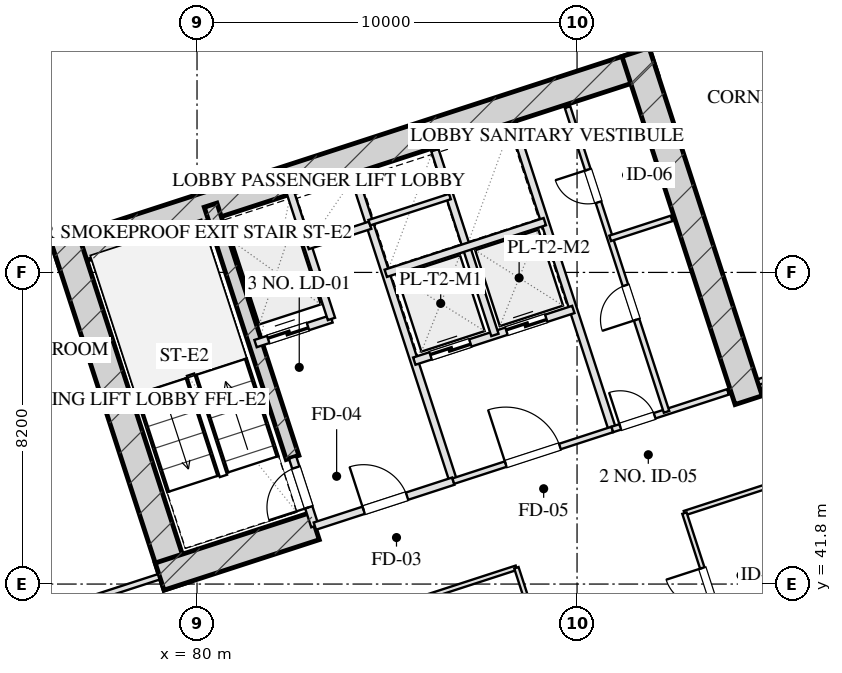
"""IFC4 building model, lengths in metres.
Left out: names, types, materials, properties, quantities, classifications, styles, units other than length and angle.
Written with IfcOpenShell. Run it as: python <this file> out.ifc"""

import sys

from ifc_helpers import new_model, si_unit, direction, frame, frame_2d, origin, place, context, subcontext, project, spatial, rectangle, extrude, element, fill, save


model = new_model("IFC4")
c1 = context("Model", 3, precision=1e-05, world=origin(), true_north=direction((0.0, 1.0)))
c2 = subcontext(c1, "Body", "Model", "MODEL_VIEW")
j1 = project(units=[si_unit("LENGTHUNIT", "METRE"), si_unit("PLANEANGLEUNIT", "RADIAN")], contexts=[c1])
p1 = place(None, origin())
s1 = spatial("IfcSite", under=j1, at=p1, CompositionType="ELEMENT")
p2 = place(p1, origin())
s2 = spatial("IfcBuilding", under=s1, at=p2, CompositionType="ELEMENT")
p3 = place(p2, frame((0.0, 0.0, 85.1)))
s3 = spatial("IfcBuildingStorey", under=s2, at=p3, CompositionType="ELEMENT", Elevation=85.1)
p4 = place(p3, frame((76.272, 50.443, 0.0), z_axis=(0.0, 0.0, 1.0), x_axis=(0.951056072937, 0.309018358888, 0.0)))
e1 = element("IfcWall", 1, at=p4, inside=s3, PredefinedType="SHEAR", context=c2, shape_type="SweptSolid", body=[
    extrude(rectangle(XDim=16.55, YDim=0.75, at=frame_2d((8.275, 0.0))), origin(), (0.0, 0.0, 1.0), 3.45),
])
for number, where, z_axis, x_axis in (
    (2, (79.489, 41.756, 0.0), (0.0, 0.0, 1.0), (-0.309, 0.951, 0.0)),
    (3, (94.515, 46.639, 0.0), (0.0, 0.0, 1.0), (-0.309, 0.951, 0.0)),
):
    element("IfcWall", number, at=place(p3, frame(where, z_axis=z_axis, x_axis=x_axis)), inside=s3, PredefinedType="SHEAR", context=c2, shape_type="SweptSolid", body=[
        extrude(rectangle(XDim=9.63, YDim=0.75, at=frame_2d((4.815, 0.0))), origin(), (0.0, 0.0, 1.0), 3.45),
    ])
p5 = place(p3, frame((82.514, 45.131, 0.0), z_axis=(0.0, 0.0, 1.0), x_axis=(-0.308988790936, 0.951065679686, 0.0)))
e4 = element("IfcWall", 4, at=p5, inside=s3, PredefinedType="SHEAR", context=c2, shape_type="SweptSolid", body=[
    extrude(rectangle(XDim=6.98, YDim=0.35, at=frame_2d((3.49, 0.0))), origin(), (0.0, 0.0, 1.0), 3.45),
])
p6 = place(p3, frame((79.016, 41.997, 0.0), z_axis=(0.0, 0.0, 1.0), x_axis=(0.95106038264, 0.309005094736, 0.0)))
e5 = element("IfcWall", 5, at=p6, inside=s3, PredefinedType="SHEAR", context=c2, shape_type="SweptSolid", body=[
    extrude(rectangle(XDim=4.295, YDim=0.75, at=frame_2d((2.147, 0.0))), origin(), (0.0, 0.0, 1.0), 3.45),
])
p7 = place(p3, frame((80.716, 6.59, 0.0), z_axis=(0.0, 0.0, 1.0), x_axis=(-0.309017542002, 0.95105633836, 0.0)))
e6 = element("IfcWall", 6, at=p7, inside=s3, PredefinedType="SOLIDWALL", context=c2, shape_type="SweptSolid", body=[
    extrude(rectangle(XDim=46.4, YDim=0.4, at=frame_2d((23.2, 0.0))), origin(), (0.0, 0.0, 1.0), 2.61),
])
p8 = place(p7, frame((28.4, 0.0, 0.75)))
e7 = element("IfcOpeningElement", 7, at=p8, cuts=e6, PredefinedType="OPENING", context=c2, shape_type="SweptSolid", body=[
    extrude(rectangle(XDim=2.4, YDim=1.46, at=frame_2d((1.2, 0.73))), frame((0.0, 0.21, 0.0), z_axis=(0.0, -1.0, 0.0), x_axis=(1.0, 0.0, 0.0)), (0.0, 0.0, 1.0), 0.42),
])
p9 = place(p3, frame((68.047, 53.995, 0.0), z_axis=(0.0, 0.0, 1.0), x_axis=(0.95105505922, 0.309021478754, 0.0)))
e8 = element("IfcWall", 8, at=p9, inside=s3, PredefinedType="SOLIDWALL", context=c2, shape_type="SweptSolid", body=[
    extrude(rectangle(XDim=29.4, YDim=0.4, at=frame_2d((14.7, 0.0))), origin(), (0.0, 0.0, 1.0), 2.61),
])
p10 = place(p3, frame((83.101, 43.324, 0.0), z_axis=(0.0, 0.0, 1.0), x_axis=(-0.309048298632, 0.951046344356, 0.0)))
e9 = element("IfcWall", 9, at=p10, inside=s3, PredefinedType="PARTITIONING", context=c2, shape_type="SweptSolid", body=[
    extrude(rectangle(XDim=1.9, YDim=0.2, at=frame_2d((0.95, 0.0))), origin(), (0.0, 0.0, 1.0), 3.175),
])
p11 = place(p10, frame((0.52, 0.0, 0.0)))
e10 = element("IfcOpeningElement", 10, at=p11, cuts=e9, PredefinedType="OPENING", context=c2, shape_type="SweptSolid", body=[
    extrude(rectangle(XDim=1.1, YDim=2.05, at=frame_2d((0.55, 1.025))), frame((0.0, 0.11, 0.0), z_axis=(0.0, -1.0, 0.0), x_axis=(1.0, 0.0, 0.0)), (0.0, 0.0, 1.0), 0.22),
])
p12 = place(p3, frame((86.743, 44.508, 0.0), z_axis=(0.0, 0.0, 1.0), x_axis=(-0.309016001439, 0.951056838919, 0.0)))
e11 = element("IfcWall", 11, at=p12, inside=s3, PredefinedType="PARTITIONING", context=c2, shape_type="SweptSolid", body=[
    extrude(rectangle(XDim=8.43, YDim=0.2, at=frame_2d((4.215, 0.0))), origin(), (0.0, 0.0, 1.0), 3.175),
])
p13 = place(p3, frame((83.101, 43.324, 0.0), z_axis=(0.0, 0.0, 1.0), x_axis=(0.951052804469, 0.309028417967, 0.0)))
e12 = element("IfcWall", 12, at=p13, inside=s3, PredefinedType="PARTITIONING", context=c2, shape_type="SweptSolid", body=[
    extrude(rectangle(XDim=3.83, YDim=0.2, at=frame_2d((1.915, 0.0))), origin(), (0.0, 0.0, 1.0), 3.175),
])
p14 = place(p13, frame((1.35, 0.0, 0.0)))
e13 = element("IfcOpeningElement", 13, at=p14, cuts=e12, PredefinedType="OPENING", context=c2, shape_type="SweptSolid", body=[
    extrude(rectangle(XDim=1.2, YDim=2.05, at=frame_2d((0.6, 1.025))), frame((0.0, 0.11, 0.0), z_axis=(0.0, -1.0, 0.0), x_axis=(1.0, 0.0, 0.0)), (0.0, 0.0, 1.0), 0.22),
])
p15 = place(p3, frame((81.54, 48.127, 0.0), z_axis=(0.0, 0.0, 1.0), x_axis=(0.951062257173, 0.308999325213, 0.0)))
e14 = element("IfcWall", 14, at=p15, inside=s3, PredefinedType="PARTITIONING", context=c2, shape_type="SweptSolid", body=[
    extrude(rectangle(XDim=2.1, YDim=0.2, at=frame_2d((1.05, 0.0))), origin(), (0.0, 0.0, 1.0), 3.175),
])
p16 = place(p15, frame((0.35, 0.0, 0.0)))
e15 = element("IfcOpeningElement", 15, at=p16, cuts=e14, PredefinedType="OPENING", context=c2, shape_type="SweptSolid", body=[
    extrude(rectangle(XDim=1.1, YDim=2.05, at=frame_2d((0.55, 1.025))), frame((0.0, 0.11, 0.0), z_axis=(0.0, -1.0, 0.0), x_axis=(1.0, 0.0, 0.0)), (0.0, 0.0, 1.0), 0.22),
])
p17 = place(p3, frame((83.538, 48.776, 0.0), z_axis=(0.0, 0.0, 1.0), x_axis=(-0.3089935693, 0.951064127245, 0.0)))
e16 = element("IfcWall", 16, at=p17, inside=s3, PredefinedType="PARTITIONING", context=c2, shape_type="SweptSolid", body=[
    extrude(rectangle(XDim=3.7, YDim=0.2, at=frame_2d((1.85, 0.0))), origin(), (0.0, 0.0, 1.0), 3.175),
])
p18 = place(p3, frame((82.91, 50.707, 0.0), z_axis=(0.0, 0.0, 1.0), x_axis=(0.951041328149, 0.309063734775, 0.0)))
e17 = element("IfcWall", 17, at=p18, inside=s3, PredefinedType="PARTITIONING", context=c2, shape_type="SweptSolid", body=[
    extrude(rectangle(XDim=1.73, YDim=0.2, at=frame_2d((0.865, 0.0))), origin(), (0.0, 0.0, 1.0), 3.175),
])
p19 = place(p3, frame((90.928, 45.868, 0.0), z_axis=(0.0, 0.0, 1.0), x_axis=(-0.309042196757, 0.951048327176, 0.0)))
e18 = element("IfcWall", 18, at=p19, inside=s3, PredefinedType="PARTITIONING", context=c2, shape_type="SweptSolid", body=[
    extrude(rectangle(XDim=8.43, YDim=0.2, at=frame_2d((4.215, 0.0))), origin(), (0.0, 0.0, 1.0), 3.175),
])
p20 = place(p3, frame((86.743, 44.508, 0.0), z_axis=(0.0, 0.0, 1.0), x_axis=(0.951063829732, 0.308994485023, 0.0)))
e19 = element("IfcWall", 19, at=p20, inside=s3, PredefinedType="PARTITIONING", context=c2, shape_type="SweptSolid", body=[
    extrude(rectangle(XDim=4.4, YDim=0.15, at=frame_2d((2.2, 0.0))), origin(), (0.0, 0.0, 1.0), 3.175),
])
p21 = place(p20, frame((1.45, 0.0, 0.0)))
e20 = element("IfcOpeningElement", 20, at=p21, cuts=e19, PredefinedType="OPENING", context=c2, shape_type="SweptSolid", body=[
    extrude(rectangle(XDim=1.5, YDim=2.05, at=frame_2d((0.75, 1.025))), frame((0.0, 0.085, 0.0), z_axis=(0.0, -1.0, 0.0), x_axis=(1.0, 0.0, 0.0)), (0.0, 0.0, 1.0), 0.17),
])
p22 = place(p3, frame((85.718, 47.666, 0.0), z_axis=(0.0, 0.0, 1.0), x_axis=(0.951058531764, 0.30901079133, 0.0)))
e21 = element("IfcWall", 21, at=p22, inside=s3, PredefinedType="PARTITIONING", context=c2, shape_type="SweptSolid", body=[
    extrude(rectangle(XDim=4.4, YDim=0.2, at=frame_2d((2.2, 0.0))), origin(), (0.0, 0.0, 1.0), 3.175),
])
p23 = place(p22, frame((0.45, 0.0, 0.0)))
e22 = element("IfcOpeningElement", 22, at=p23, cuts=e21, PredefinedType="OPENING", context=c2, shape_type="SweptSolid", body=[
    extrude(rectangle(XDim=1.1, YDim=2.05, at=frame_2d((0.55, 1.025))), frame((0.0, 0.11, 0.0), z_axis=(0.0, -1.0, 0.0), x_axis=(1.0, 0.0, 0.0)), (0.0, 0.0, 1.0), 0.22),
])
p24 = place(p22, frame((2.55, 0.0, 0.0)))
e23 = element("IfcOpeningElement", 23, at=p24, cuts=e21, PredefinedType="OPENING", context=c2, shape_type="SweptSolid", body=[
    extrude(rectangle(XDim=1.1, YDim=2.05, at=frame_2d((0.55, 1.025))), frame((0.0, 0.11, 0.0), z_axis=(0.0, -1.0, 0.0), x_axis=(1.0, 0.0, 0.0)), (0.0, 0.0, 1.0), 0.22),
])
p25 = place(p3, frame((87.838, 48.354, 0.0), z_axis=(0.0, 0.0, 1.0), x_axis=(-0.3090093719, 0.951058992953, 0.0)))
e24 = element("IfcWall", 24, at=p25, inside=s3, PredefinedType="PARTITIONING", context=c2, shape_type="SweptSolid", body=[
    extrude(rectangle(XDim=5.11, YDim=0.2, at=frame_2d((2.555, 0.0))), origin(), (0.0, 0.0, 1.0), 3.175),
])
p26 = place(p3, frame((84.967, 49.977, 0.0), z_axis=(0.0, 0.0, 1.0), x_axis=(0.951063829732, 0.308994485023, 0.0)))
e25 = element("IfcWall", 25, at=p26, inside=s3, PredefinedType="PARTITIONING", context=c2, shape_type="SweptSolid", body=[
    extrude(rectangle(XDim=4.4, YDim=0.2, at=frame_2d((2.2, 0.0))), origin(), (0.0, 0.0, 1.0), 3.175),
])
p27 = place(p3, frame((84.534, 51.308, 0.0), z_axis=(0.0, 0.0, 1.0), x_axis=(0.951075093106, 0.308959814982, 0.0)))
e26 = element("IfcWall", 26, at=p27, inside=s3, PredefinedType="PARTITIONING", context=c2, shape_type="SweptSolid", body=[
    extrude(rectangle(XDim=2.23, YDim=0.15, at=frame_2d((1.115, 0.0))), origin(), (0.0, 0.0, 1.0), 3.175),
])
p28 = place(p3, frame((90.928, 45.868, 0.0), z_axis=(0.0, 0.0, 1.0), x_axis=(0.951059297078, 0.309008435874, 0.0)))
e27 = element("IfcWall", 27, at=p28, inside=s3, PredefinedType="PARTITIONING", context=c2, shape_type="SweptSolid", body=[
    extrude(rectangle(XDim=3.2, YDim=0.15, at=frame_2d((1.6, 0.0))), origin(), (0.0, 0.0, 1.0), 3.175),
])
p29 = place(p28, frame((0.22, 0.0, 0.0)))
e28 = element("IfcOpeningElement", 28, at=p29, cuts=e27, PredefinedType="OPENING", context=c2, shape_type="SweptSolid", body=[
    extrude(rectangle(XDim=0.95, YDim=2.05, at=frame_2d((0.475, 1.025))), frame((0.0, 0.085, 0.0), z_axis=(0.0, -1.0, 0.0), x_axis=(1.0, 0.0, 0.0)), (0.0, 0.0, 1.0), 0.17),
])
p30 = place(p3, frame((92.355, 46.331, 0.0), z_axis=(0.0, 0.0, 1.0), x_axis=(-0.309007490203, 0.951059604335, 0.0)))
e29 = element("IfcWall", 29, at=p30, inside=s3, PredefinedType="PARTITIONING", context=c2, shape_type="SweptSolid", body=[
    extrude(rectangle(XDim=8.43, YDim=0.15, at=frame_2d((4.215, 0.0))), origin(), (0.0, 0.0, 1.0), 3.175),
])
p31 = place(p30, frame((2.55, 0.0, 0.0)))
e30 = element("IfcOpeningElement", 30, at=p31, cuts=e29, PredefinedType="OPENING", context=c2, shape_type="SweptSolid", body=[
    extrude(rectangle(XDim=0.95, YDim=2.05, at=frame_2d((0.475, 1.025))), frame((0.0, 0.085, 0.0), z_axis=(0.0, -1.0, 0.0), x_axis=(1.0, 0.0, 0.0)), (0.0, 0.0, 1.0), 0.17),
])
p32 = place(p30, frame((5.8, 0.0, 0.0)))
e31 = element("IfcOpeningElement", 31, at=p32, cuts=e29, PredefinedType="OPENING", context=c2, shape_type="SweptSolid", body=[
    extrude(rectangle(XDim=0.9, YDim=2.05, at=frame_2d((0.45, 1.025))), frame((0.0, 0.085, 0.0), z_axis=(0.0, -1.0, 0.0), x_axis=(1.0, 0.0, 0.0)), (0.0, 0.0, 1.0), 0.17),
])
p33 = place(p3, frame((90.871, 50.896, 0.0), z_axis=(0.0, 0.0, 1.0), x_axis=(0.951054116971, 0.309024378638, 0.0)))
e32 = element("IfcWall", 32, at=p33, inside=s3, PredefinedType="PARTITIONING", context=c2, shape_type="SweptSolid", body=[
    extrude(rectangle(XDim=1.7, YDim=0.15, at=frame_2d((0.85, 0.0))), origin(), (0.0, 0.0, 1.0), 3.175),
])
p34 = place(p3, frame((70.338, 39.177, 0.0), z_axis=(0.0, 0.0, 1.0), x_axis=(0.951059695568, 0.309007209409, 0.0)))
e33 = element("IfcWall", 33, at=p34, inside=s3, PredefinedType="PARTITIONING", context=c2, shape_type="SweptSolid", body=[
    extrude(rectangle(XDim=9.1, YDim=0.15, at=frame_2d((4.55, 0.0))), origin(), (0.0, 0.0, 1.0), 3.175),
])
p35 = place(p34, frame((3.822, 0.0, 0.0)))
e34 = element("IfcOpeningElement", 34, at=p35, cuts=e33, PredefinedType="OPENING", context=c2, shape_type="SweptSolid", body=[
    extrude(rectangle(XDim=1.0, YDim=2.05, at=frame_2d((0.5, 1.025))), frame((0.0, 0.085, 0.0), z_axis=(0.0, -1.0, 0.0), x_axis=(1.0, 0.0, 0.0)), (0.0, 0.0, 1.0), 0.17),
])
p36 = place(p3, frame((94.78, 47.119, 0.0), z_axis=(0.0, 0.0, 1.0), x_axis=(0.951054329824, 0.309023723562, 0.0)))
e35 = element("IfcWall", 35, at=p36, inside=s3, PredefinedType="PARTITIONING", context=c2, shape_type="SweptSolid", body=[
    extrude(rectangle(XDim=8.5, YDim=0.15, at=frame_2d((4.25, 0.0))), origin(), (0.0, 0.0, 1.0), 3.175),
])
p37 = place(p36, frame((3.57, 0.0, 0.0)))
e36 = element("IfcOpeningElement", 36, at=p37, cuts=e35, PredefinedType="OPENING", context=c2, shape_type="SweptSolid", body=[
    extrude(rectangle(XDim=1.0, YDim=2.05, at=frame_2d((0.5, 1.025))), frame((0.0, 0.085, 0.0), z_axis=(0.0, -1.0, 0.0), x_axis=(1.0, 0.0, 0.0)), (0.0, 0.0, 1.0), 0.17),
])
p38 = place(p3, frame((71.166, 36.629, 0.0), z_axis=(0.0, 0.0, 1.0), x_axis=(0.951057625014, 0.309013582067, 0.0)))
e37 = element("IfcWall", 37, at=p38, inside=s3, PredefinedType="PARTITIONING", context=c2, shape_type="SweptSolid", body=[
    extrude(rectangle(XDim=18.125, YDim=0.12, at=frame_2d((9.062, 0.0))), origin(), (0.0, 0.0, 1.0), 3.175),
])
p39 = place(p3, frame((92.826, 43.667, 0.0), z_axis=(0.0, 0.0, 1.0), x_axis=(0.951057778088, 0.309013110947, 0.0)))
e38 = element("IfcWall", 38, at=p39, inside=s3, PredefinedType="PARTITIONING", context=c2, shape_type="SweptSolid", body=[
    extrude(rectangle(XDim=11.425, YDim=0.12, at=frame_2d((5.712, 0.0))), origin(), (0.0, 0.0, 1.0), 3.175),
])
p40 = place(p3, frame((93.546, 26.404, 0.0), z_axis=(0.0, 0.0, 1.0), x_axis=(-0.309022042254, 0.951054876125, 0.0)))
e39 = element("IfcWall", 39, at=p40, inside=s3, PredefinedType="PARTITIONING", context=c2, shape_type="SweptSolid", body=[
    extrude(rectangle(XDim=16.64, YDim=0.12, at=frame_2d((8.32, 0.0))), origin(), (0.0, 0.0, 1.0), 3.175),
])
p41 = place(p40, frame((1.16, 0.0, 0.0)))
e40 = element("IfcOpeningElement", 40, at=p41, cuts=e39, PredefinedType="OPENING", context=c2, shape_type="SweptSolid", body=[
    extrude(rectangle(XDim=1.0, YDim=2.05, at=frame_2d((0.5, 1.025))), frame((0.0, 0.07, 0.0), z_axis=(0.0, -1.0, 0.0), x_axis=(1.0, 0.0, 0.0)), (0.0, 0.0, 1.0), 0.14),
])
p42 = place(p40, frame((4.72, 0.0, 0.0)))
e41 = element("IfcOpeningElement", 41, at=p42, cuts=e39, PredefinedType="OPENING", context=c2, shape_type="SweptSolid", body=[
    extrude(rectangle(XDim=1.05, YDim=2.05, at=frame_2d((0.525, 1.025))), frame((0.0, 0.07, 0.0), z_axis=(0.0, -1.0, 0.0), x_axis=(1.0, 0.0, 0.0)), (0.0, 0.0, 1.0), 0.14),
])
p43 = place(p40, frame((7.823, 0.0, 0.0)))
e42 = element("IfcOpeningElement", 42, at=p43, cuts=e39, PredefinedType="OPENING", context=c2, shape_type="SweptSolid", body=[
    extrude(rectangle(XDim=1.0, YDim=2.05, at=frame_2d((0.5, 1.025))), frame((0.0, 0.07, 0.0), z_axis=(0.0, -1.0, 0.0), x_axis=(1.0, 0.0, 0.0)), (0.0, 0.0, 1.0), 0.14),
])
p44 = place(p40, frame((10.69, 0.0, 0.0)))
e43 = element("IfcOpeningElement", 43, at=p44, cuts=e39, PredefinedType="OPENING", context=c2, shape_type="SweptSolid", body=[
    extrude(rectangle(XDim=1.0, YDim=2.05, at=frame_2d((0.5, 1.025))), frame((0.0, 0.07, 0.0), z_axis=(0.0, -1.0, 0.0), x_axis=(1.0, 0.0, 0.0)), (0.0, 0.0, 1.0), 0.14),
])
p45 = place(p40, frame((14.247, 0.0, 0.0)))
e44 = element("IfcOpeningElement", 44, at=p45, cuts=e39, PredefinedType="OPENING", context=c2, shape_type="SweptSolid", body=[
    extrude(rectangle(XDim=1.0, YDim=2.05, at=frame_2d((0.5, 1.025))), frame((0.0, 0.07, 0.0), z_axis=(0.0, -1.0, 0.0), x_axis=(1.0, 0.0, 0.0)), (0.0, 0.0, 1.0), 0.14),
])
p46 = place(p3, frame((97.968, 27.841, 0.0), z_axis=(0.0, 0.0, 1.0), x_axis=(-0.30901773025, 0.951056277195, 0.0)))
e45 = element("IfcWall", 45, at=p46, inside=s3, PredefinedType="PARTITIONING", context=c2, shape_type="SweptSolid", body=[
    extrude(rectangle(XDim=16.64, YDim=0.12, at=frame_2d((8.32, 0.0))), origin(), (0.0, 0.0, 1.0), 3.175),
])
p47 = place(p46, frame((3.06, 0.0, 0.0)))
e46 = element("IfcOpeningElement", 46, at=p47, cuts=e45, PredefinedType="OPENING", context=c2, shape_type="SweptSolid", body=[
    extrude(rectangle(XDim=1.0, YDim=2.05, at=frame_2d((0.5, 1.025))), frame((0.0, 0.07, 0.0), z_axis=(0.0, -1.0, 0.0), x_axis=(1.0, 0.0, 0.0)), (0.0, 0.0, 1.0), 0.14),
])
p48 = place(p46, frame((9.363, 0.0, 0.0)))
e47 = element("IfcOpeningElement", 47, at=p48, cuts=e45, PredefinedType="OPENING", context=c2, shape_type="SweptSolid", body=[
    extrude(rectangle(XDim=1.0, YDim=2.05, at=frame_2d((0.5, 1.025))), frame((0.0, 0.07, 0.0), z_axis=(0.0, -1.0, 0.0), x_axis=(1.0, 0.0, 0.0)), (0.0, 0.0, 1.0), 0.14),
])
p49 = place(p46, frame((14.123, 0.0, 0.0)))
e48 = element("IfcOpeningElement", 48, at=p49, cuts=e45, PredefinedType="OPENING", context=c2, shape_type="SweptSolid", body=[
    extrude(rectangle(XDim=1.0, YDim=2.05, at=frame_2d((0.5, 1.025))), frame((0.0, 0.07, 0.0), z_axis=(0.0, -1.0, 0.0), x_axis=(1.0, 0.0, 0.0)), (0.0, 0.0, 1.0), 0.14),
])
p50 = place(p3, frame((94.073, 39.829, 0.0), z_axis=(0.0, 0.0, 1.0), x_axis=(0.951057778088, 0.309013110947, 0.0)))
e49 = element("IfcWall", 49, at=p50, inside=s3, PredefinedType="PARTITIONING", context=c2, shape_type="SweptSolid", body=[
    extrude(rectangle(XDim=11.425, YDim=0.12, at=frame_2d((5.712, 0.0))), origin(), (0.0, 0.0, 1.0), 3.175),
])
p51 = place(p11, origin())
e50 = element("IfcDoor", 50, at=p51, inside=s3, OperationType="SINGLE_SWING_LEFT", PredefinedType="DOOR", context=c2, shape_type="SweptSolid", body=[
    extrude(rectangle(XDim=1.1, YDim=2.05, at=frame_2d((0.55, 1.025))), frame((0.0, 0.025, 0.0), z_axis=(0.0, -1.0, 0.0), x_axis=(1.0, 0.0, 0.0)), (0.0, 0.0, 1.0), 0.05),
])
fill(e10, e50)
p52 = place(p14, origin())
e51 = element("IfcDoor", 51, at=p52, inside=s3, OperationType="SINGLE_SWING_LEFT", PredefinedType="DOOR", context=c2, shape_type="SweptSolid", body=[
    extrude(rectangle(XDim=1.2, YDim=2.05, at=frame_2d((0.6, 1.025))), frame((0.0, 0.025, 0.0), z_axis=(0.0, -1.0, 0.0), x_axis=(1.0, 0.0, 0.0)), (0.0, 0.0, 1.0), 0.05),
])
fill(e13, e51)
p53 = place(p16, origin())
e52 = element("IfcDoor", 52, at=p53, inside=s3, OperationType="DOUBLE_DOOR_SLIDING", PredefinedType="DOOR", context=c2, shape_type="SweptSolid", body=[
    extrude(rectangle(XDim=1.1, YDim=2.05, at=frame_2d((0.55, 1.025))), frame((0.0, 0.025, 0.0), z_axis=(0.0, -1.0, 0.0), x_axis=(1.0, 0.0, 0.0)), (0.0, 0.0, 1.0), 0.05),
])
fill(e15, e52)
p54 = place(p21, origin())
e53 = element("IfcDoor", 53, at=p54, inside=s3, OperationType="SINGLE_SWING_LEFT", PredefinedType="DOOR", context=c2, shape_type="SweptSolid", body=[
    extrude(rectangle(XDim=1.5, YDim=2.05, at=frame_2d((0.75, 1.025))), frame((0.0, 0.025, 0.0), z_axis=(0.0, -1.0, 0.0), x_axis=(1.0, 0.0, 0.0)), (0.0, 0.0, 1.0), 0.05),
])
fill(e20, e53)
p55 = place(p23, origin())
e54 = element("IfcDoor", 54, at=p55, inside=s3, OperationType="DOUBLE_DOOR_SLIDING", PredefinedType="DOOR", context=c2, shape_type="SweptSolid", body=[
    extrude(rectangle(XDim=1.1, YDim=2.05, at=frame_2d((0.55, 1.025))), frame((0.0, 0.025, 0.0), z_axis=(0.0, -1.0, 0.0), x_axis=(1.0, 0.0, 0.0)), (0.0, 0.0, 1.0), 0.05),
])
fill(e22, e54)
p56 = place(p24, origin())
e55 = element("IfcDoor", 55, at=p56, inside=s3, OperationType="DOUBLE_DOOR_SLIDING", PredefinedType="DOOR", context=c2, shape_type="SweptSolid", body=[
    extrude(rectangle(XDim=1.1, YDim=2.05, at=frame_2d((0.55, 1.025))), frame((0.0, 0.025, 0.0), z_axis=(0.0, -1.0, 0.0), x_axis=(1.0, 0.0, 0.0)), (0.0, 0.0, 1.0), 0.05),
])
fill(e23, e55)
p57 = place(p29, origin())
e56 = element("IfcDoor", 56, at=p57, inside=s3, OperationType="SINGLE_SWING_LEFT", PredefinedType="DOOR", context=c2, shape_type="SweptSolid", body=[
    extrude(rectangle(XDim=0.95, YDim=2.05, at=frame_2d((0.475, 1.025))), frame((0.0, 0.025, 0.0), z_axis=(0.0, -1.0, 0.0), x_axis=(1.0, 0.0, 0.0)), (0.0, 0.0, 1.0), 0.05),
])
fill(e28, e56)
p58 = place(p31, origin())
e57 = element("IfcDoor", 57, at=p58, inside=s3, OperationType="SINGLE_SWING_LEFT", PredefinedType="DOOR", context=c2, shape_type="SweptSolid", body=[
    extrude(rectangle(XDim=0.95, YDim=2.05, at=frame_2d((0.475, 1.025))), frame((0.0, 0.025, 0.0), z_axis=(0.0, -1.0, 0.0), x_axis=(1.0, 0.0, 0.0)), (0.0, 0.0, 1.0), 0.05),
])
fill(e30, e57)
p59 = place(p32, origin())
e58 = element("IfcDoor", 58, at=p59, inside=s3, OperationType="SINGLE_SWING_RIGHT", PredefinedType="DOOR", context=c2, shape_type="SweptSolid", body=[
    extrude(rectangle(XDim=0.9, YDim=2.05, at=frame_2d((0.45, 1.025))), frame((0.0, 0.025, 0.0), z_axis=(0.0, -1.0, 0.0), x_axis=(1.0, 0.0, 0.0)), (0.0, 0.0, 1.0), 0.05),
])
fill(e31, e58)
p60 = place(p49, origin())
e59 = element("IfcDoor", 59, at=p60, inside=s3, OperationType="SINGLE_SWING_RIGHT", PredefinedType="DOOR", context=c2, shape_type="SweptSolid", body=[
    extrude(rectangle(XDim=1.0, YDim=2.05, at=frame_2d((0.5, 1.025))), frame((0.0, 0.025, 0.0), z_axis=(0.0, -1.0, 0.0), x_axis=(1.0, 0.0, 0.0)), (0.0, 0.0, 1.0), 0.05),
])
fill(e48, e59)
save(model, sys.argv[1])
